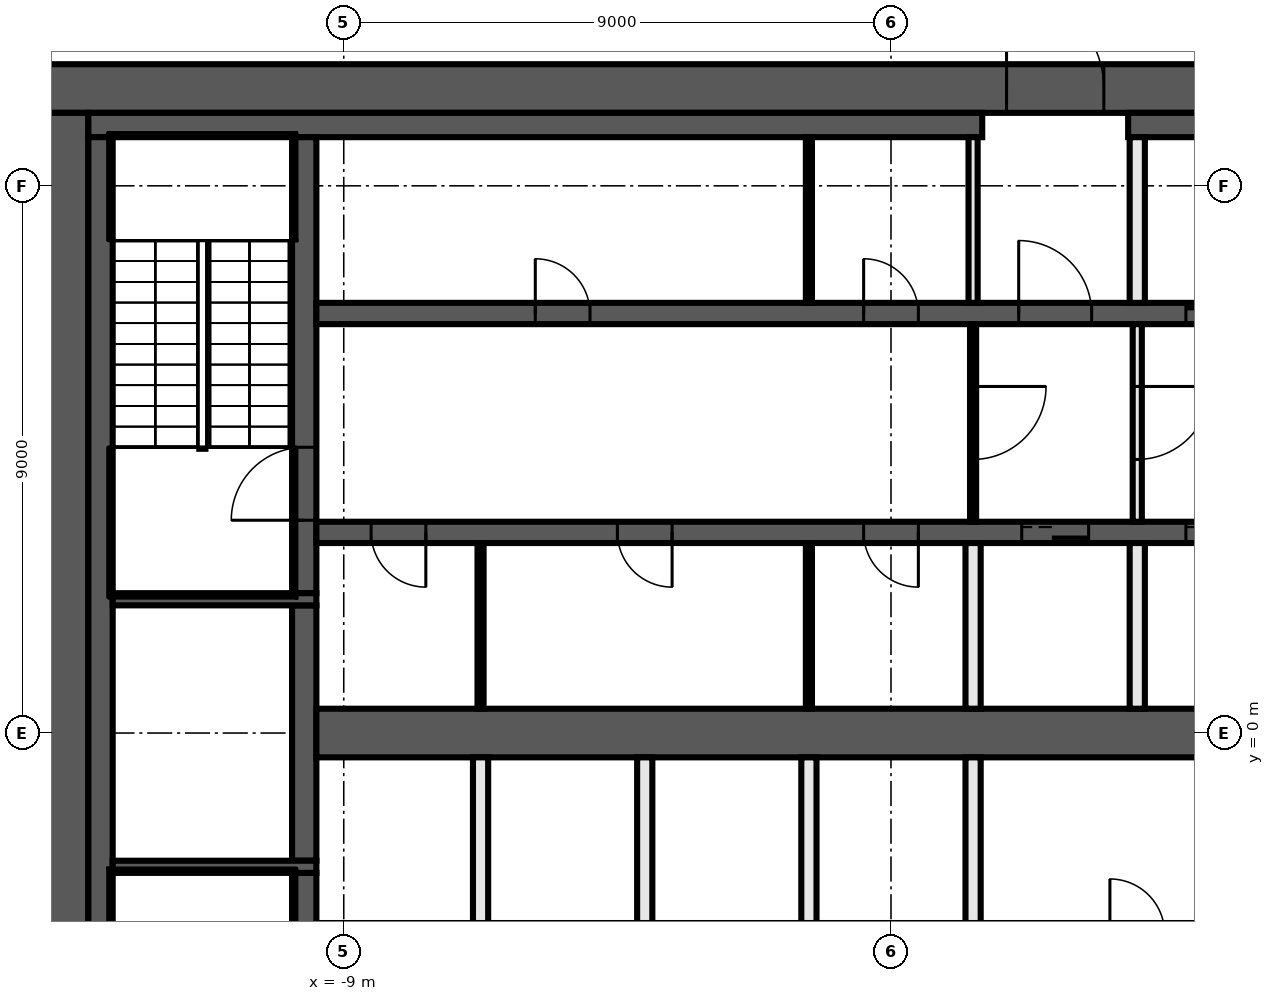
"""IFC4 building model, lengths in metres.
Left out: names, types, materials, properties, quantities, classifications, styles, units other than length and angle.
Written with IfcOpenShell. Run it as: python <this file> out.ifc"""

import sys

from ifc_helpers import new_model, si_unit, direction, frame, frame_2d, origin, place, context, subcontext, project, spatial, rectangle, extrude, element, fill, save


model = new_model("IFC4")
c1 = context("Model", 3, precision=1e-05, world=origin(), true_north=direction((0.0, 1.0)))
c2 = subcontext(c1, "Body", "Model", "MODEL_VIEW")
j1 = project(units=[si_unit("LENGTHUNIT", "METRE"), si_unit("PLANEANGLEUNIT", "RADIAN")], contexts=[c1])
p1 = place(None, origin())
s1 = spatial("IfcSite", under=j1, at=p1, CompositionType="ELEMENT")
p2 = place(p1, origin())
s2 = spatial("IfcBuilding", under=s1, at=p2, CompositionType="ELEMENT")
p3 = place(p2, frame((0.0, 0.0, 183.8)))
s3 = spatial("IfcBuildingStorey", under=s2, at=p3, CompositionType="ELEMENT", Elevation=183.8)
p4 = place(p3, frame((-14.0, 10.6, 0.0), z_axis=(0.0, 0.0, 1.0), x_axis=(1.0, 0.0, 0.0)))
e1 = element("IfcWall", 1, at=p4, inside=s3, PredefinedType="SHEAR", context=c2, shape_type="SweptSolid", body=[
    extrude(rectangle(XDim=28.0, YDim=0.8, at=frame_2d((14.0, 0.0))), origin(), (0.0, 0.0, 1.0), 14.62),
])
p5 = place(p4, frame((15.9, 0.0, 0.0)))
e2 = element("IfcOpeningElement", 2, at=p5, cuts=e1, PredefinedType="OPENING", context=c2, shape_type="SweptSolid", body=[
    extrude(rectangle(XDim=1.6, YDim=2.1, at=frame_2d((0.8, 1.05))), frame((0.0, 0.41, 0.0), z_axis=(0.0, -1.0, 0.0), x_axis=(1.0, 0.0, 0.0)), (0.0, 0.0, 1.0), 0.82),
])
p6 = place(p3, frame((-13.6, -10.2, 0.0), z_axis=(0.0, 0.0, 1.0), x_axis=(0.0, 1.0, 0.0)))
e3 = element("IfcWall", 3, at=p6, inside=s3, PredefinedType="SHEAR", context=c2, shape_type="SweptSolid", body=[
    extrude(rectangle(XDim=20.4, YDim=0.8, at=frame_2d((10.2, 0.0))), origin(), (0.0, 0.0, 1.0), 14.62),
])
p7 = place(p3, frame((-13.2, 10.0, 0.0), z_axis=(0.0, 0.0, 1.0), x_axis=(1.0, 0.0, 0.0)))
e4 = element("IfcWall", 4, at=p7, inside=s3, PredefinedType="SHEAR", context=c2, shape_type="SweptSolid", body=[
    extrude(rectangle(XDim=14.7, YDim=0.4, at=frame_2d((7.35, 0.0))), origin(), (0.0, 0.0, 1.0), 14.62),
])
p8 = place(p3, frame((3.9, 10.0, 0.0), z_axis=(0.0, 0.0, 1.0), x_axis=(1.0, 0.0, 0.0)))
e5 = element("IfcWall", 5, at=p8, inside=s3, PredefinedType="SHEAR", context=c2, shape_type="SweptSolid", body=[
    extrude(rectangle(XDim=9.3, YDim=0.4, at=frame_2d((4.65, 0.0))), origin(), (0.0, 0.0, 1.0), 14.62),
])
p9 = place(p3, frame((-13.0, -9.8, 0.0), z_axis=(0.0, 0.0, 1.0), x_axis=(0.0, 1.0, 0.0)))
e6 = element("IfcWall", 6, at=p9, inside=s3, PredefinedType="SHEAR", context=c2, shape_type="SweptSolid", body=[
    extrude(rectangle(XDim=19.6, YDim=0.4, at=frame_2d((9.8, 0.0))), origin(), (0.0, 0.0, 1.0), 14.62),
])
p10 = place(p3, frame((-9.65, -9.8, 0.0), z_axis=(0.0, 0.0, 1.0), x_axis=(0.0, 1.0, 0.0)))
e7 = element("IfcWall", 7, at=p10, inside=s3, PredefinedType="SHEAR", context=c2, shape_type="SweptSolid", body=[
    extrude(rectangle(XDim=7.5, YDim=0.4, at=frame_2d((3.75, 0.0))), origin(), (0.0, 0.0, 1.0), 14.62),
])
p11 = place(p10, frame((5.1, 0.0, 0.0)))
e8 = element("IfcOpeningElement", 8, at=p11, cuts=e7, PredefinedType="OPENING", context=c2, shape_type="SweptSolid", body=[
    extrude(rectangle(XDim=1.2, YDim=2.1, at=frame_2d((0.6, 1.05))), frame((0.0, 0.21, 0.0), z_axis=(0.0, -1.0, 0.0), x_axis=(1.0, 0.0, 0.0)), (0.0, 0.0, 1.0), 0.42),
])
p12 = place(p3, frame((-9.65, -2.1, 0.0), z_axis=(0.0, 0.0, 1.0), x_axis=(0.0, 1.0, 0.0)))
e9 = element("IfcWall", 9, at=p12, inside=s3, PredefinedType="SHEAR", context=c2, shape_type="SweptSolid", body=[
    extrude(rectangle(XDim=4.2, YDim=0.4, at=frame_2d((2.1, 0.0))), origin(), (0.0, 0.0, 1.0), 14.62),
])
p13 = place(p3, frame((-9.65, 2.3, 0.0), z_axis=(0.0, 0.0, 1.0), x_axis=(0.0, 1.0, 0.0)))
e10 = element("IfcWall", 10, at=p13, inside=s3, PredefinedType="SHEAR", context=c2, shape_type="SweptSolid", body=[
    extrude(rectangle(XDim=7.5, YDim=0.4, at=frame_2d((3.75, 0.0))), origin(), (0.0, 0.0, 1.0), 14.62),
])
p14 = place(p13, frame((1.2, 0.0, 0.0)))
e11 = element("IfcOpeningElement", 11, at=p14, cuts=e10, PredefinedType="OPENING", context=c2, shape_type="SweptSolid", body=[
    extrude(rectangle(XDim=1.2, YDim=2.1, at=frame_2d((0.6, 1.05))), frame((0.0, 0.21, 0.0), z_axis=(0.0, -1.0, 0.0), x_axis=(1.0, 0.0, 0.0)), (0.0, 0.0, 1.0), 0.42),
])
for number, where, z_axis, x_axis in (
    (12, (-9.45, 2.2, 0.0), (0.0, 0.0, 1.0), (-1.0, 0.0, 0.0)),
    (13, (-9.45, -2.2, 0.0), (0.0, 0.0, 1.0), (-1.0, 0.0, 0.0)),
):
    element("IfcWall", number, at=place(p3, frame(where, z_axis=z_axis, x_axis=x_axis)), inside=s3, PredefinedType="SHEAR", context=c2, shape_type="SweptSolid", body=[
        extrude(rectangle(XDim=3.35, YDim=0.2, at=frame_2d((1.675, 0.0))), origin(), (0.0, 0.0, 1.0), 14.62),
    ])
p15 = place(p3, frame((-9.45, 6.9, 0.0), z_axis=(0.0, 0.0, 1.0), x_axis=(1.0, 0.0, 0.0)))
e14 = element("IfcWall", 14, at=p15, inside=s3, PredefinedType="SHEAR", context=c2, shape_type="SweptSolid", body=[
    extrude(rectangle(XDim=18.9, YDim=0.35, at=frame_2d((9.45, 0.0))), origin(), (0.0, 0.0, 1.0), 14.62),
])
p16 = place(p15, frame((11.55, 0.0, 0.0)))
e15 = element("IfcOpeningElement", 15, at=p16, cuts=e14, PredefinedType="OPENING", context=c2, shape_type="SweptSolid", body=[
    extrude(rectangle(XDim=1.2, YDim=2.1, at=frame_2d((0.6, 1.05))), frame((0.0, 0.185, 0.0), z_axis=(0.0, -1.0, 0.0), x_axis=(1.0, 0.0, 0.0)), (0.0, 0.0, 1.0), 0.37),
])
p17 = place(p15, frame((14.3, 0.0, 0.0)))
e16 = element("IfcOpeningElement", 16, at=p17, cuts=e14, PredefinedType="OPENING", context=c2, shape_type="SweptSolid", body=[
    extrude(rectangle(XDim=1.1, YDim=2.1, at=frame_2d((0.55, 1.05))), frame((0.0, 0.185, 0.0), z_axis=(0.0, -1.0, 0.0), x_axis=(1.0, 0.0, 0.0)), (0.0, 0.0, 1.0), 0.37),
])
p18 = place(p15, frame((17.0, 0.0, 0.0)))
e17 = element("IfcOpeningElement", 17, at=p18, cuts=e14, PredefinedType="OPENING", context=c2, shape_type="SweptSolid", body=[
    extrude(rectangle(XDim=1.1, YDim=2.1, at=frame_2d((0.55, 1.05))), frame((0.0, 0.185, 0.0), z_axis=(0.0, -1.0, 0.0), x_axis=(1.0, 0.0, 0.0)), (0.0, 0.0, 1.0), 0.37),
])
p19 = place(p15, frame((3.6, 0.0, 0.0)))
e18 = element("IfcOpeningElement", 18, at=p19, cuts=e14, PredefinedType="OPENING", context=c2, shape_type="SweptSolid", body=[
    extrude(rectangle(XDim=0.9, YDim=2.1, at=frame_2d((0.45, 1.05))), frame((0.0, 0.185, 0.0), z_axis=(0.0, -1.0, 0.0), x_axis=(1.0, 0.0, 0.0)), (0.0, 0.0, 1.0), 0.37),
])
p20 = place(p15, frame((9.0, 0.0, 0.0)))
e19 = element("IfcOpeningElement", 19, at=p20, cuts=e14, PredefinedType="OPENING", context=c2, shape_type="SweptSolid", body=[
    extrude(rectangle(XDim=0.9, YDim=2.1, at=frame_2d((0.45, 1.05))), frame((0.0, 0.185, 0.0), z_axis=(0.0, -1.0, 0.0), x_axis=(1.0, 0.0, 0.0)), (0.0, 0.0, 1.0), 0.37),
])
p21 = place(p3, frame((9.45, 3.3, 0.0), z_axis=(0.0, 0.0, 1.0), x_axis=(-1.0, 0.0, 0.0)))
e20 = element("IfcWall", 20, at=p21, inside=s3, PredefinedType="SHEAR", context=c2, shape_type="SweptSolid", body=[
    extrude(rectangle(XDim=18.9, YDim=0.35, at=frame_2d((9.45, 0.0))), origin(), (0.0, 0.0, 1.0), 14.62),
])
p22 = place(p21, frame((6.2, 0.0, 0.0)))
e21 = element("IfcOpeningElement", 21, at=p22, cuts=e20, PredefinedType="OPENING", context=c2, shape_type="SweptSolid", body=[
    extrude(rectangle(XDim=1.1, YDim=2.1, at=frame_2d((0.55, 1.05))), frame((0.0, 0.185, 0.0), z_axis=(0.0, -1.0, 0.0), x_axis=(1.0, 0.0, 0.0)), (0.0, 0.0, 1.0), 0.37),
])
p23 = place(p21, frame((3.5, 0.0, 0.0)))
e22 = element("IfcOpeningElement", 22, at=p23, cuts=e20, PredefinedType="OPENING", context=c2, shape_type="SweptSolid", body=[
    extrude(rectangle(XDim=1.1, YDim=2.1, at=frame_2d((0.55, 1.05))), frame((0.0, 0.185, 0.0), z_axis=(0.0, -1.0, 0.0), x_axis=(1.0, 0.0, 0.0)), (0.0, 0.0, 1.0), 0.37),
])
p24 = place(p21, frame((0.9, 0.0, 0.0)))
e23 = element("IfcOpeningElement", 23, at=p24, cuts=e20, PredefinedType="OPENING", context=c2, shape_type="SweptSolid", body=[
    extrude(rectangle(XDim=0.9, YDim=2.1, at=frame_2d((0.45, 1.05))), frame((0.0, 0.185, 0.0), z_axis=(0.0, -1.0, 0.0), x_axis=(1.0, 0.0, 0.0)), (0.0, 0.0, 1.0), 0.37),
])
p25 = place(p21, frame((17.1, 0.0, 0.0)))
e24 = element("IfcOpeningElement", 24, at=p25, cuts=e20, PredefinedType="OPENING", context=c2, shape_type="SweptSolid", body=[
    extrude(rectangle(XDim=0.9, YDim=2.1, at=frame_2d((0.45, 1.05))), frame((0.0, 0.185, 0.0), z_axis=(0.0, -1.0, 0.0), x_axis=(1.0, 0.0, 0.0)), (0.0, 0.0, 1.0), 0.37),
])
p26 = place(p21, frame((13.05, 0.0, 0.0)))
e25 = element("IfcOpeningElement", 25, at=p26, cuts=e20, PredefinedType="OPENING", context=c2, shape_type="SweptSolid", body=[
    extrude(rectangle(XDim=0.9, YDim=2.1, at=frame_2d((0.45, 1.05))), frame((0.0, 0.185, 0.0), z_axis=(0.0, -1.0, 0.0), x_axis=(1.0, 0.0, 0.0)), (0.0, 0.0, 1.0), 0.37),
])
p27 = place(p21, frame((9.0, 0.0, 0.0)))
e26 = element("IfcOpeningElement", 26, at=p27, cuts=e20, PredefinedType="OPENING", context=c2, shape_type="SweptSolid", body=[
    extrude(rectangle(XDim=0.9, YDim=2.1, at=frame_2d((0.45, 1.05))), frame((0.0, 0.185, 0.0), z_axis=(0.0, -1.0, 0.0), x_axis=(1.0, 0.0, 0.0)), (0.0, 0.0, 1.0), 0.37),
])
p28 = place(p3, frame((-9.45, 0.0, 0.0), z_axis=(0.0, 0.0, 1.0), x_axis=(1.0, 0.0, 0.0)))
e27 = element("IfcWall", 27, at=p28, inside=s3, PredefinedType="SHEAR", context=c2, shape_type="SweptSolid", body=[
    extrude(rectangle(XDim=18.9, YDim=0.8, at=frame_2d((9.45, 0.0))), origin(), (0.0, 0.0, 1.0), 14.62),
])
p29 = place(p3, frame((4.05, 6.725, 0.0), z_axis=(0.0, 0.0, 1.0), x_axis=(0.0, -1.0, 0.0)))
e28 = element("IfcWall", 28, at=p29, inside=s3, PredefinedType="PARTITIONING", context=c2, shape_type="SweptSolid", body=[
    extrude(rectangle(XDim=3.25, YDim=0.15, at=frame_2d((1.625, 0.0))), origin(), (0.0, 0.0, 1.0), 14.62),
])
p30 = place(p29, frame((1.025, 0.0, 0.0)))
e29 = element("IfcOpeningElement", 29, at=p30, cuts=e28, PredefinedType="OPENING", context=c2, shape_type="SweptSolid", body=[
    extrude(rectangle(XDim=1.2, YDim=2.1, at=frame_2d((0.6, 1.05))), frame((0.0, 0.085, 0.0), z_axis=(0.0, -1.0, 0.0), x_axis=(1.0, 0.0, 0.0)), (0.0, 0.0, 1.0), 0.17),
])
for number, where, z_axis, x_axis in (
    (30, (4.05, 0.4, 0.0), (0.0, 0.0, 1.0), (0.0, 1.0, 0.0)),
    (31, (4.05, 7.075, 0.0), (0.0, 0.0, 1.0), (0.0, 1.0, 0.0)),
):
    element("IfcWall", number, at=place(p3, frame(where, z_axis=z_axis, x_axis=x_axis)), inside=s3, PredefinedType="SOLIDWALL", context=c2, shape_type="SweptSolid", body=[
        extrude(rectangle(XDim=2.725, YDim=0.25, at=frame_2d((1.363, 0.0))), origin(), (0.0, 0.0, 1.0), 14.62),
    ])
p31 = place(p3, frame((1.35, 7.075, 0.0), z_axis=(0.0, 0.0, 1.0), x_axis=(0.0, 1.0, 0.0)))
e32 = element("IfcWall", 32, at=p31, inside=s3, PredefinedType="PARTITIONING", context=c2, shape_type="SweptSolid", body=[
    extrude(rectangle(XDim=2.725, YDim=0.15, at=frame_2d((1.363, 0.0))), origin(), (0.0, 0.0, 1.0), 14.62),
])
p32 = place(p3, frame((1.35, 6.725, 0.0), z_axis=(0.0, 0.0, 1.0), x_axis=(0.0, -1.0, 0.0)))
e33 = element("IfcWall", 33, at=p32, inside=s3, PredefinedType="PARTITIONING", context=c2, shape_type="SweptSolid", body=[
    extrude(rectangle(XDim=3.25, YDim=0.1, at=frame_2d((1.625, 0.0))), origin(), (0.0, 0.0, 1.0), 14.62),
])
p33 = place(p32, frame((1.025, 0.0, 0.0)))
e34 = element("IfcOpeningElement", 34, at=p33, cuts=e33, PredefinedType="OPENING", context=c2, shape_type="SweptSolid", body=[
    extrude(rectangle(XDim=1.2, YDim=2.1, at=frame_2d((0.6, 1.05))), frame((0.0, 0.06, 0.0), z_axis=(0.0, -1.0, 0.0), x_axis=(1.0, 0.0, 0.0)), (0.0, 0.0, 1.0), 0.12),
])
for number, where, z_axis, x_axis in (
    (35, (1.35, -3.125, 0.0), (0.0, 0.0, 1.0), (0.0, 1.0, 0.0)),
    (36, (1.35, 0.4, 0.0), (0.0, 0.0, 1.0), (0.0, 1.0, 0.0)),
):
    element("IfcWall", number, at=place(p3, frame(where, z_axis=z_axis, x_axis=x_axis)), inside=s3, PredefinedType="SOLIDWALL", context=c2, shape_type="SweptSolid", body=[
        extrude(rectangle(XDim=2.725, YDim=0.25, at=frame_2d((1.363, 0.0))), origin(), (0.0, 0.0, 1.0), 14.62),
    ])
for number, where, z_axis, x_axis in (
    (37, (-1.35, 0.4, 0.0), (0.0, 0.0, 1.0), (0.0, 1.0, 0.0)),
    (38, (-1.35, 7.075, 0.0), (0.0, 0.0, 1.0), (0.0, 1.0, 0.0)),
):
    element("IfcWall", number, at=place(p3, frame(where, z_axis=z_axis, x_axis=x_axis)), inside=s3, PredefinedType="PARTITIONING", context=c2, shape_type="SweptSolid", body=[
        extrude(rectangle(XDim=2.725, YDim=0.1, at=frame_2d((1.363, 0.0))), origin(), (0.0, 0.0, 1.0), 14.62),
    ])
for number, where, z_axis, x_axis in (
    (39, (-1.35, -3.125, 0.0), (0.0, 0.0, 1.0), (0.0, 1.0, 0.0)),
    (40, (-4.05, -3.125, 0.0), (0.0, 0.0, 1.0), (0.0, 1.0, 0.0)),
):
    element("IfcWall", number, at=place(p3, frame(where, z_axis=z_axis, x_axis=x_axis)), inside=s3, PredefinedType="SOLIDWALL", context=c2, shape_type="SweptSolid", body=[
        extrude(rectangle(XDim=2.725, YDim=0.25, at=frame_2d((1.363, 0.0))), origin(), (0.0, 0.0, 1.0), 14.62),
    ])
p34 = place(p3, frame((-6.75, 0.4, 0.0), z_axis=(0.0, 0.0, 1.0), x_axis=(0.0, 1.0, 0.0)))
e41 = element("IfcWall", 41, at=p34, inside=s3, PredefinedType="PARTITIONING", context=c2, shape_type="SweptSolid", body=[
    extrude(rectangle(XDim=2.725, YDim=0.1, at=frame_2d((1.363, 0.0))), origin(), (0.0, 0.0, 1.0), 14.62),
])
p35 = place(p3, frame((-6.75, -3.125, 0.0), z_axis=(0.0, 0.0, 1.0), x_axis=(0.0, 1.0, 0.0)))
e42 = element("IfcWall", 42, at=p35, inside=s3, PredefinedType="SOLIDWALL", context=c2, shape_type="SweptSolid", body=[
    extrude(rectangle(XDim=2.725, YDim=0.25, at=frame_2d((1.363, 0.0))), origin(), (0.0, 0.0, 1.0), 14.62),
])
p36 = place(p5, origin())
e43 = element("IfcDoor", 43, at=p36, inside=s3, OperationType="DOUBLE_DOOR_SINGLE_SWING", PredefinedType="DOOR", context=c2, shape_type="SweptSolid", body=[
    extrude(rectangle(XDim=1.6, YDim=2.1, at=frame_2d((0.8, 1.05))), frame((0.0, 0.025, 0.0), z_axis=(0.0, -1.0, 0.0), x_axis=(1.0, 0.0, 0.0)), (0.0, 0.0, 1.0), 0.05),
])
fill(e2, e43)
p37 = place(p16, origin())
e44 = element("IfcDoor", 44, at=p37, inside=s3, OperationType="SINGLE_SWING_LEFT", PredefinedType="DOOR", context=c2, shape_type="SweptSolid", body=[
    extrude(rectangle(XDim=1.2, YDim=2.1, at=frame_2d((0.6, 1.05))), frame((0.0, 0.025, 0.0), z_axis=(0.0, -1.0, 0.0), x_axis=(1.0, 0.0, 0.0)), (0.0, 0.0, 1.0), 0.05),
])
fill(e15, e44)
p38 = place(p17, origin())
e45 = element("IfcDoor", 45, at=p38, inside=s3, OperationType="DOUBLE_DOOR_SLIDING", PredefinedType="DOOR", context=c2, shape_type="SweptSolid", body=[
    extrude(rectangle(XDim=1.1, YDim=2.1, at=frame_2d((0.55, 1.05))), frame((0.0, 0.025, 0.0), z_axis=(0.0, -1.0, 0.0), x_axis=(1.0, 0.0, 0.0)), (0.0, 0.0, 1.0), 0.05),
])
fill(e16, e45)
p39 = place(p22, origin())
e46 = element("IfcDoor", 46, at=p39, inside=s3, OperationType="DOUBLE_DOOR_SLIDING", PredefinedType="DOOR", context=c2, shape_type="SweptSolid", body=[
    extrude(rectangle(XDim=1.1, YDim=2.1, at=frame_2d((0.55, 1.05))), frame((0.0, 0.025, 0.0), z_axis=(0.0, -1.0, 0.0), x_axis=(1.0, 0.0, 0.0)), (0.0, 0.0, 1.0), 0.05),
])
fill(e21, e46)
p40 = place(p23, origin())
e47 = element("IfcDoor", 47, at=p40, inside=s3, OperationType="DOUBLE_DOOR_SLIDING", PredefinedType="DOOR", context=c2, shape_type="SweptSolid", body=[
    extrude(rectangle(XDim=1.1, YDim=2.1, at=frame_2d((0.55, 1.05))), frame((0.0, 0.025, 0.0), z_axis=(0.0, -1.0, 0.0), x_axis=(1.0, 0.0, 0.0)), (0.0, 0.0, 1.0), 0.05),
])
fill(e22, e47)
p41 = place(p19, origin())
e48 = element("IfcDoor", 48, at=p41, inside=s3, OperationType="SINGLE_SWING_RIGHT", PredefinedType="DOOR", context=c2, shape_type="SweptSolid", body=[
    extrude(rectangle(XDim=0.9, YDim=2.1, at=frame_2d((0.45, 1.05))), frame((0.0, 0.025, 0.0), z_axis=(0.0, -1.0, 0.0), x_axis=(1.0, 0.0, 0.0)), (0.0, 0.0, 1.0), 0.05),
])
fill(e18, e48)
p42 = place(p20, origin())
e49 = element("IfcDoor", 49, at=p42, inside=s3, OperationType="SINGLE_SWING_LEFT", PredefinedType="DOOR", context=c2, shape_type="SweptSolid", body=[
    extrude(rectangle(XDim=0.9, YDim=2.1, at=frame_2d((0.45, 1.05))), frame((0.0, 0.025, 0.0), z_axis=(0.0, -1.0, 0.0), x_axis=(1.0, 0.0, 0.0)), (0.0, 0.0, 1.0), 0.05),
])
fill(e19, e49)
p43 = place(p25, origin())
e50 = element("IfcDoor", 50, at=p43, inside=s3, OperationType="SINGLE_SWING_RIGHT", PredefinedType="DOOR", context=c2, shape_type="SweptSolid", body=[
    extrude(rectangle(XDim=0.9, YDim=2.1, at=frame_2d((0.45, 1.05))), frame((0.0, 0.025, 0.0), z_axis=(0.0, -1.0, 0.0), x_axis=(1.0, 0.0, 0.0)), (0.0, 0.0, 1.0), 0.05),
])
fill(e24, e50)
p44 = place(p26, origin())
e51 = element("IfcDoor", 51, at=p44, inside=s3, OperationType="SINGLE_SWING_LEFT", PredefinedType="DOOR", context=c2, shape_type="SweptSolid", body=[
    extrude(rectangle(XDim=0.9, YDim=2.1, at=frame_2d((0.45, 1.05))), frame((0.0, 0.025, 0.0), z_axis=(0.0, -1.0, 0.0), x_axis=(1.0, 0.0, 0.0)), (0.0, 0.0, 1.0), 0.05),
])
fill(e25, e51)
p45 = place(p27, origin())
e52 = element("IfcDoor", 52, at=p45, inside=s3, OperationType="SINGLE_SWING_RIGHT", PredefinedType="DOOR", context=c2, shape_type="SweptSolid", body=[
    extrude(rectangle(XDim=0.9, YDim=2.1, at=frame_2d((0.45, 1.05))), frame((0.0, 0.025, 0.0), z_axis=(0.0, -1.0, 0.0), x_axis=(1.0, 0.0, 0.0)), (0.0, 0.0, 1.0), 0.05),
])
fill(e26, e52)
p46 = place(p14, origin())
e53 = element("IfcDoor", 53, at=p46, inside=s3, OperationType="SINGLE_SWING_RIGHT", PredefinedType="DOOR", context=c2, shape_type="SweptSolid", body=[
    extrude(rectangle(XDim=1.2, YDim=2.1, at=frame_2d((0.6, 1.05))), frame((0.0, 0.025, 0.0), z_axis=(0.0, -1.0, 0.0), x_axis=(1.0, 0.0, 0.0)), (0.0, 0.0, 1.0), 0.05),
])
fill(e11, e53)
p47 = place(p33, origin())
e54 = element("IfcDoor", 54, at=p47, inside=s3, OperationType="SINGLE_SWING_LEFT", PredefinedType="DOOR", context=c2, shape_type="SweptSolid", body=[
    extrude(rectangle(XDim=1.2, YDim=2.1, at=frame_2d((0.6, 1.05))), frame((0.0, 0.025, 0.0), z_axis=(0.0, -1.0, 0.0), x_axis=(1.0, 0.0, 0.0)), (0.0, 0.0, 1.0), 0.05),
])
fill(e34, e54)
p48 = place(p30, origin())
e55 = element("IfcDoor", 55, at=p48, inside=s3, OperationType="SINGLE_SWING_RIGHT", PredefinedType="DOOR", context=c2, shape_type="SweptSolid", body=[
    extrude(rectangle(XDim=1.2, YDim=2.1, at=frame_2d((0.6, 1.05))), frame((0.0, 0.025, 0.0), z_axis=(0.0, -1.0, 0.0), x_axis=(1.0, 0.0, 0.0)), (0.0, 0.0, 1.0), 0.05),
])
fill(e29, e55)
save(model, sys.argv[1])
